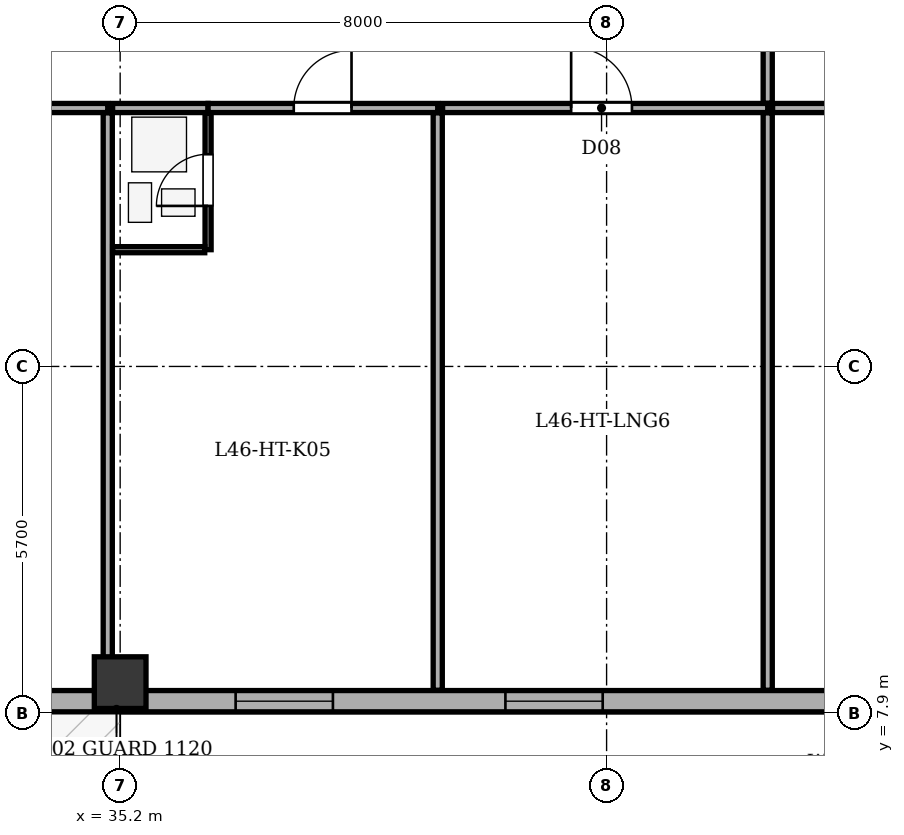
"""IFC4 building model, lengths in metres.
Left out: names, types, materials, properties, quantities, classifications, styles, units other than length and angle.
Written with IfcOpenShell. Run it as: python <this file> out.ifc"""

import sys

from ifc_helpers import new_model, si_unit, direction, frame, frame_2d, origin, origin_2d, place, context, subcontext, project, spatial, rectangle, extrude, element, fill, save


model = new_model("IFC4")
c1 = context("Model", 3, precision=1e-05, world=origin(), true_north=direction((0.0, 1.0)))
c2 = subcontext(c1, "Body", "Model", "MODEL_VIEW")
j1 = project(units=[si_unit("LENGTHUNIT", "METRE"), si_unit("PLANEANGLEUNIT", "RADIAN")], contexts=[c1])
p1 = place(None, origin())
s1 = spatial("IfcSite", under=j1, at=p1, CompositionType="ELEMENT")
p2 = place(p1, origin())
s2 = spatial("IfcBuilding", under=s1, at=p2, CompositionType="ELEMENT")
p3 = place(p2, frame((0.0, 0.0, 179.8)))
s3 = spatial("IfcBuildingStorey", under=s2, at=p3, CompositionType="ELEMENT", Elevation=179.8)
p4 = place(p3, frame((35.2, 8.4, 0.0), z_axis=(0.0, 0.0, 1.0), x_axis=(1.0, 0.0, 0.0)))
e1 = element("IfcColumn", 1, at=p4, inside=s3, PredefinedType="COLUMN", context=c2, shape_type="SweptSolid", body=[
    extrude(rectangle(XDim=0.85, YDim=0.85, at=origin_2d()), origin(), (0.0, 0.0, 1.0), 3.5),
])
p5 = place(p3, frame((50.7, 8.095, 0.0), z_axis=(0.0, 0.0, 1.0), x_axis=(-1.0, 0.0, 0.0)))
e2 = element("IfcWall", 2, at=p5, inside=s3, PredefinedType="STANDARD", context=c2, shape_type="SweptSolid", body=[
    extrude(rectangle(XDim=35.0, YDim=0.35, at=frame_2d((17.5, 0.0))), origin(), (0.0, 0.0, 1.0), 2.435),
])
p6 = place(p5, frame((26.0, 0.0, 0.0)))
e3 = element("IfcOpeningElement", 3, at=p6, cuts=e2, PredefinedType="OPENING", context=c2, shape_type="SweptSolid", body=[
    extrude(rectangle(XDim=1.0, YDim=2.02, at=frame_2d((0.5, 1.01))), frame((0.0, 0.185, 0.0), z_axis=(0.0, -1.0, 0.0), x_axis=(1.0, 0.0, 0.0)), (0.0, 0.0, 1.0), 0.37),
])
p7 = place(p5, frame((1.763, 0.0, 0.75)))
e4 = element("IfcOpeningElement", 4, at=p7, cuts=e2, PredefinedType="OPENING", context=c2, shape_type="SweptSolid", body=[
    extrude(rectangle(XDim=1.6, YDim=1.565, at=frame_2d((0.8, 0.782))), frame((0.0, 0.185, 0.0), z_axis=(0.0, -1.0, 0.0), x_axis=(1.0, 0.0, 0.0)), (0.0, 0.0, 1.0), 0.37),
])
p8 = place(p5, frame((7.564, 0.0, 0.75)))
e5 = element("IfcOpeningElement", 5, at=p8, cuts=e2, PredefinedType="OPENING", context=c2, shape_type="SweptSolid", body=[
    extrude(rectangle(XDim=1.6, YDim=1.565, at=frame_2d((0.8, 0.782))), frame((0.0, 0.185, 0.0), z_axis=(0.0, -1.0, 0.0), x_axis=(1.0, 0.0, 0.0)), (0.0, 0.0, 1.0), 0.37),
])
p9 = place(p5, frame((12.001, 0.0, 0.75)))
e6 = element("IfcOpeningElement", 6, at=p9, cuts=e2, PredefinedType="OPENING", context=c2, shape_type="SweptSolid", body=[
    extrude(rectangle(XDim=1.6, YDim=1.565, at=frame_2d((0.8, 0.782))), frame((0.0, 0.185, 0.0), z_axis=(0.0, -1.0, 0.0), x_axis=(1.0, 0.0, 0.0)), (0.0, 0.0, 1.0), 0.37),
])
p10 = place(p5, frame((17.467, 0.0, 0.75)))
e7 = element("IfcOpeningElement", 7, at=p10, cuts=e2, PredefinedType="OPENING", context=c2, shape_type="SweptSolid", body=[
    extrude(rectangle(XDim=1.6, YDim=1.565, at=frame_2d((0.8, 0.782))), frame((0.0, 0.185, 0.0), z_axis=(0.0, -1.0, 0.0), x_axis=(1.0, 0.0, 0.0)), (0.0, 0.0, 1.0), 0.37),
])
p11 = place(p5, frame((31.801, 0.0, 0.75)))
e8 = element("IfcOpeningElement", 8, at=p11, cuts=e2, PredefinedType="OPENING", context=c2, shape_type="SweptSolid", body=[
    extrude(rectangle(XDim=1.6, YDim=1.565, at=frame_2d((0.8, 0.782))), frame((0.0, 0.185, 0.0), z_axis=(0.0, -1.0, 0.0), x_axis=(1.0, 0.0, 0.0)), (0.0, 0.0, 1.0), 0.37),
])
p12 = place(p5, frame((23.914, 0.0, 0.75)))
e9 = element("IfcOpeningElement", 9, at=p12, cuts=e2, PredefinedType="OPENING", context=c2, shape_type="SweptSolid", body=[
    extrude(rectangle(XDim=0.75, YDim=1.45, at=frame_2d((0.375, 0.725))), frame((0.0, 0.185, 0.0), z_axis=(0.0, -1.0, 0.0), x_axis=(1.0, 0.0, 0.0)), (0.0, 0.0, 1.0), 0.37),
])
p13 = place(p3, frame((31.52, 17.85, 0.0), z_axis=(0.0, 0.0, 1.0), x_axis=(1.0, 0.0, 0.0)))
e10 = element("IfcWall", 10, at=p13, inside=s3, PredefinedType="PARTITIONING", context=c2, shape_type="SweptSolid", body=[
    extrude(rectangle(XDim=3.476, YDim=0.15, at=frame_2d((1.738, 0.0))), origin(), (0.0, 0.0, 1.0), 3.05),
])
p14 = place(p13, frame((1.258, 0.0, 0.0)))
e11 = element("IfcOpeningElement", 11, at=p14, cuts=e10, PredefinedType="OPENING", context=c2, shape_type="SweptSolid", body=[
    extrude(rectangle(XDim=0.95, YDim=2.1, at=frame_2d((0.475, 1.05))), frame((0.0, 0.085, 0.0), z_axis=(0.0, -1.0, 0.0), x_axis=(1.0, 0.0, 0.0)), (0.0, 0.0, 1.0), 0.17),
])
p15 = place(p3, frame((34.996, 8.275, 0.0), z_axis=(0.0, 0.0, 1.0), x_axis=(0.0, 1.0, 0.0)))
e12 = element("IfcWall", 12, at=p15, inside=s3, PredefinedType="PARTITIONING", context=c2, shape_type="SweptSolid", body=[
    extrude(rectangle(XDim=9.495, YDim=0.15, at=frame_2d((4.748, 0.0))), origin(), (0.0, 0.0, 1.0), 2.235),
])
p16 = place(p3, frame((35.076, 17.85, 0.0), z_axis=(0.0, 0.0, 1.0), x_axis=(1.0, 0.0, 0.0)))
e13 = element("IfcWall", 13, at=p16, inside=s3, PredefinedType="PARTITIONING", context=c2, shape_type="SweptSolid", body=[
    extrude(rectangle(XDim=1.57, YDim=0.15, at=frame_2d((0.785, 0.0))), origin(), (0.0, 0.0, 1.0), 3.05),
])
p17 = place(p3, frame((36.646, 17.85, 0.0), z_axis=(0.0, 0.0, 1.0), x_axis=(1.0, 0.0, 0.0)))
e14 = element("IfcWall", 14, at=p17, inside=s3, PredefinedType="PARTITIONING", context=c2, shape_type="SweptSolid", body=[
    extrude(rectangle(XDim=3.777, YDim=0.15, at=frame_2d((1.889, 0.0))), origin(), (0.0, 0.0, 1.0), 3.05),
])
p18 = place(p17, frame((1.409, 0.0, 0.0)))
e15 = element("IfcOpeningElement", 15, at=p18, cuts=e14, PredefinedType="OPENING", context=c2, shape_type="SweptSolid", body=[
    extrude(rectangle(XDim=0.95, YDim=2.1, at=frame_2d((0.475, 1.05))), frame((0.0, 0.085, 0.0), z_axis=(0.0, -1.0, 0.0), x_axis=(1.0, 0.0, 0.0)), (0.0, 0.0, 1.0), 0.17),
])
p19 = place(p3, frame((36.646, 15.52, 0.0), z_axis=(0.0, 0.0, 1.0), x_axis=(0.0, 1.0, 0.0)))
e16 = element("IfcWall", 16, at=p19, inside=s3, PredefinedType="PARTITIONING", context=c2, shape_type="SweptSolid", body=[
    extrude(rectangle(XDim=2.25, YDim=0.1, at=frame_2d((1.125, 0.0))), origin(), (0.0, 0.0, 1.0), 2.485),
])
p20 = place(p19, frame((0.72, 0.0, 0.0)))
e17 = element("IfcOpeningElement", 17, at=p20, cuts=e16, PredefinedType="OPENING", context=c2, shape_type="SweptSolid", body=[
    extrude(rectangle(XDim=0.85, YDim=2.05, at=frame_2d((0.425, 1.025))), frame((0.0, 0.06, 0.0), z_axis=(0.0, -1.0, 0.0), x_axis=(1.0, 0.0, 0.0)), (0.0, 0.0, 1.0), 0.12),
])
p21 = place(p3, frame((35.076, 15.52, 0.0), z_axis=(0.0, 0.0, 1.0), x_axis=(1.0, 0.0, 0.0)))
e18 = element("IfcWall", 18, at=p21, inside=s3, PredefinedType="PARTITIONING", context=c2, shape_type="SweptSolid", body=[
    extrude(rectangle(XDim=1.515, YDim=0.1, at=frame_2d((0.758, 0.0))), origin(), (0.0, 0.0, 1.0), 3.05),
])
p22 = place(p3, frame((40.423, 8.275, 0.0), z_axis=(0.0, 0.0, 1.0), x_axis=(0.0, 1.0, 0.0)))
e19 = element("IfcWall", 19, at=p22, inside=s3, PredefinedType="PARTITIONING", context=c2, shape_type="SweptSolid", body=[
    extrude(rectangle(XDim=9.495, YDim=0.15, at=frame_2d((4.748, 0.0))), origin(), (0.0, 0.0, 1.0), 2.485),
])
p23 = place(p3, frame((40.503, 17.85, 0.0), z_axis=(0.0, 0.0, 1.0), x_axis=(1.0, 0.0, 0.0)))
e20 = element("IfcWall", 20, at=p23, inside=s3, PredefinedType="PARTITIONING", context=c2, shape_type="SweptSolid", body=[
    extrude(rectangle(XDim=5.347, YDim=0.15, at=frame_2d((2.674, 0.0))), origin(), (0.0, 0.0, 1.0), 3.05),
])
p24 = place(p23, frame((2.114, 0.0, 0.0)))
e21 = element("IfcOpeningElement", 21, at=p24, cuts=e20, PredefinedType="OPENING", context=c2, shape_type="SweptSolid", body=[
    extrude(rectangle(XDim=1.0, YDim=2.1, at=frame_2d((0.5, 1.05))), frame((0.0, 0.085, 0.0), z_axis=(0.0, -1.0, 0.0), x_axis=(1.0, 0.0, 0.0)), (0.0, 0.0, 1.0), 0.17),
])
p25 = place(p3, frame((45.85, 8.275, 0.0), z_axis=(0.0, 0.0, 1.0), x_axis=(0.0, 1.0, 0.0)))
e22 = element("IfcWall", 22, at=p25, inside=s3, PredefinedType="PARTITIONING", context=c2, shape_type="SweptSolid", body=[
    extrude(rectangle(XDim=9.495, YDim=0.15, at=frame_2d((4.748, 0.0))), origin(), (0.0, 0.0, 1.0), 3.05),
])
p26 = place(p3, frame((45.93, 17.85, 0.0), z_axis=(0.0, 0.0, 1.0), x_axis=(1.0, 0.0, 0.0)))
e23 = element("IfcWall", 23, at=p26, inside=s3, PredefinedType="PARTITIONING", context=c2, shape_type="SweptSolid", body=[
    extrude(rectangle(XDim=9.395, YDim=0.15, at=frame_2d((4.698, 0.0))), origin(), (0.0, 0.0, 1.0), 3.05),
])
p27 = place(p3, frame((45.85, 17.93, 0.0), z_axis=(0.0, 0.0, 1.0), x_axis=(0.0, 1.0, 0.0)))
e24 = element("IfcWall", 24, at=p27, inside=s3, PredefinedType="PARTITIONING", context=c2, shape_type="SweptSolid", body=[
    extrude(rectangle(XDim=6.27, YDim=0.15, at=frame_2d((3.135, 0.0))), origin(), (0.0, 0.0, 1.0), 3.05),
])
p28 = place(p27, frame((2.615, 0.0, 0.0)))
e25 = element("IfcOpeningElement", 25, at=p28, cuts=e24, PredefinedType="OPENING", context=c2, shape_type="SweptSolid", body=[
    extrude(rectangle(XDim=0.95, YDim=2.1, at=frame_2d((0.475, 1.05))), frame((0.0, 0.085, 0.0), z_axis=(0.0, -1.0, 0.0), x_axis=(1.0, 0.0, 0.0)), (0.0, 0.0, 1.0), 0.17),
])
p29 = place(p8, origin())
e26 = element("IfcWindow", 26, at=p29, inside=s3, PartitioningType="SINGLE_PANEL", PredefinedType="WINDOW", context=c2, shape_type="SweptSolid", body=[
    extrude(rectangle(XDim=1.6, YDim=1.565, at=frame_2d((0.8, 0.782))), frame((0.0, -0.01, 0.0), z_axis=(0.0, -1.0, 0.0), x_axis=(1.0, 0.0, 0.0)), (0.0, 0.0, 1.0), 0.06),
])
fill(e5, e26)
p30 = place(p9, origin())
e27 = element("IfcWindow", 27, at=p30, inside=s3, PartitioningType="SINGLE_PANEL", PredefinedType="WINDOW", context=c2, shape_type="SweptSolid", body=[
    extrude(rectangle(XDim=1.6, YDim=1.565, at=frame_2d((0.8, 0.782))), frame((0.0, -0.01, 0.0), z_axis=(0.0, -1.0, 0.0), x_axis=(1.0, 0.0, 0.0)), (0.0, 0.0, 1.0), 0.06),
])
fill(e6, e27)
p31 = place(p20, origin())
e28 = element("IfcDoor", 28, at=p31, inside=s3, OperationType="SINGLE_SWING_LEFT", PredefinedType="DOOR", context=c2, shape_type="SweptSolid", body=[
    extrude(rectangle(XDim=0.85, YDim=2.05, at=frame_2d((0.425, 1.025))), frame((0.0, 0.025, 0.0), z_axis=(0.0, -1.0, 0.0), x_axis=(1.0, 0.0, 0.0)), (0.0, 0.0, 1.0), 0.05),
])
fill(e17, e28)
p32 = place(p18, origin())
e29 = element("IfcDoor", 29, at=p32, inside=s3, OperationType="SINGLE_SWING_RIGHT", PredefinedType="DOOR", context=c2, shape_type="SweptSolid", body=[
    extrude(rectangle(XDim=0.95, YDim=2.1, at=frame_2d((0.475, 1.05))), frame((0.0, 0.025, 0.0), z_axis=(0.0, -1.0, 0.0), x_axis=(1.0, 0.0, 0.0)), (0.0, 0.0, 1.0), 0.05),
])
fill(e15, e29)
p33 = place(p24, origin())
e30 = element("IfcDoor", 30, at=p33, inside=s3, OperationType="SINGLE_SWING_LEFT", PredefinedType="DOOR", context=c2, shape_type="SweptSolid", body=[
    extrude(rectangle(XDim=1.0, YDim=2.1, at=frame_2d((0.5, 1.05))), frame((0.0, 0.025, 0.0), z_axis=(0.0, -1.0, 0.0), x_axis=(1.0, 0.0, 0.0)), (0.0, 0.0, 1.0), 0.05),
])
fill(e21, e30)
save(model, sys.argv[1])
